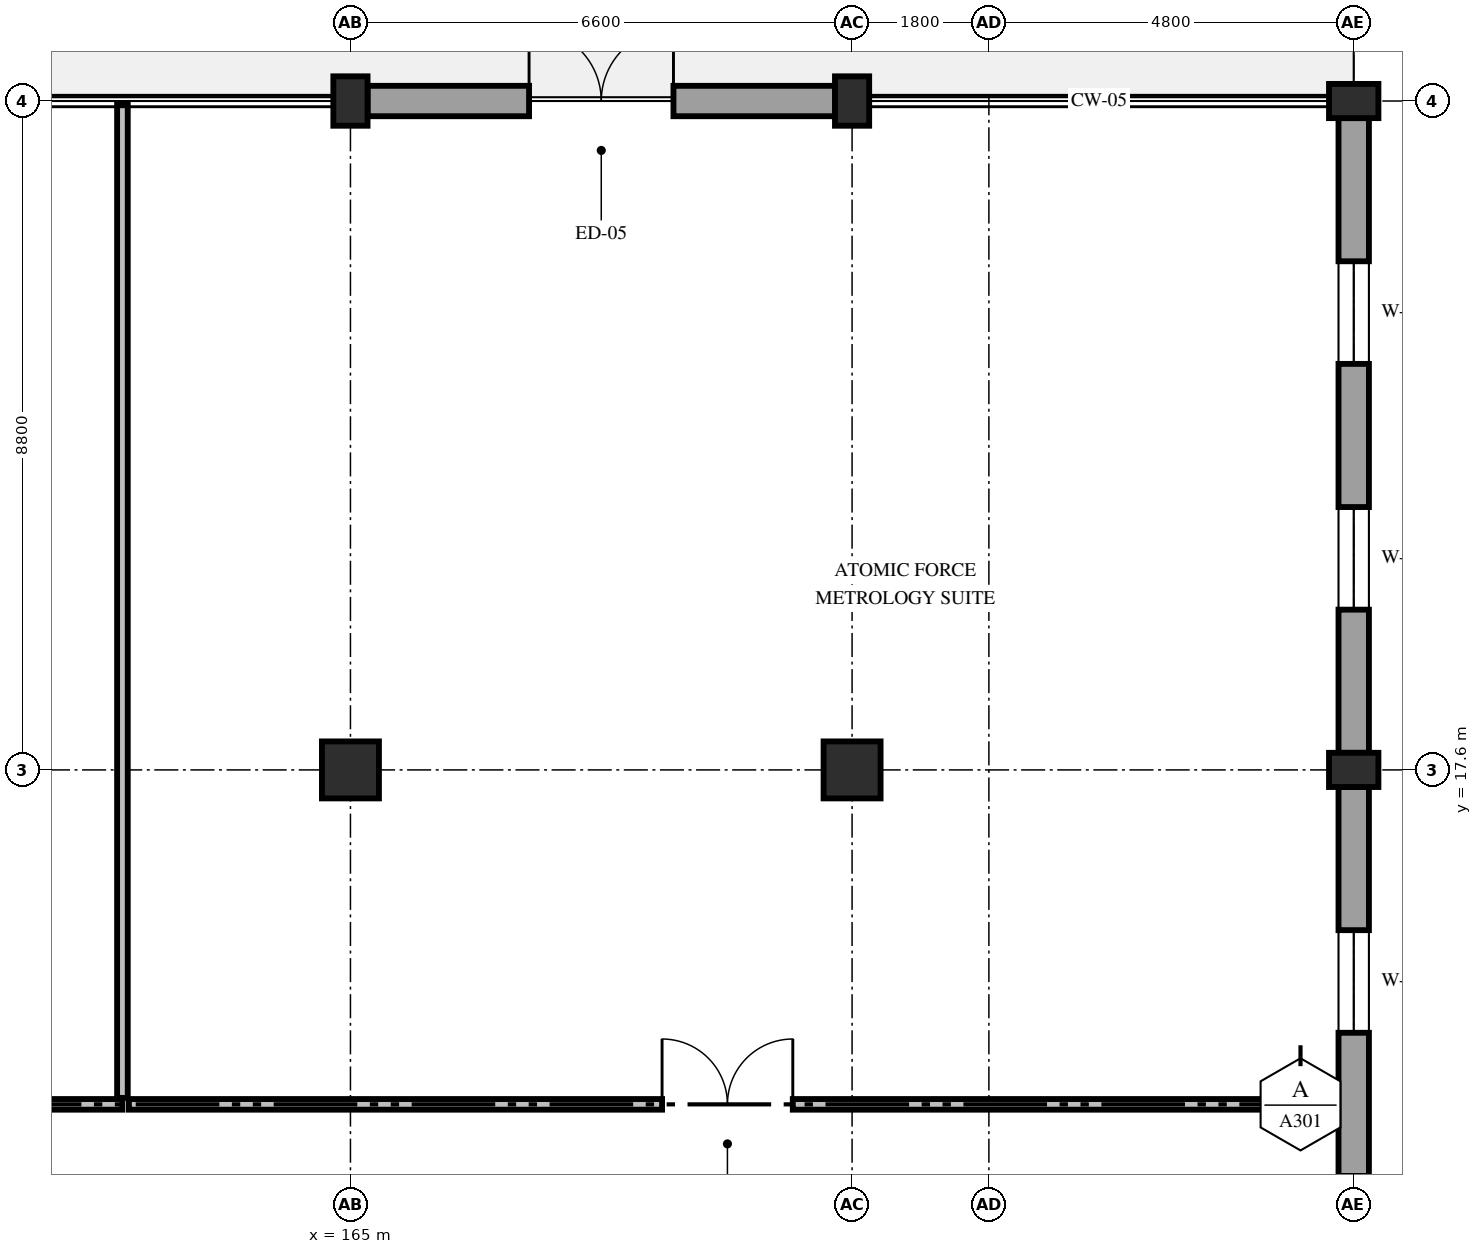
"""IFC4 building model, lengths in metres.
Left out: names, types, materials, properties, quantities, classifications, styles, units other than length and angle.
Written with IfcOpenShell. Run it as: python <this file> out.ifc"""

import sys

from ifc_helpers import new_model, si_unit, direction, frame, frame_2d, origin, origin_2d, place, context, subcontext, project, spatial, rectangle, extrude, element, fill, save


model = new_model("IFC4")
c1 = context("Model", 3, precision=1e-05, world=origin(), true_north=direction((0.0, 1.0)))
c2 = subcontext(c1, "Body", "Model", "MODEL_VIEW")
j1 = project(units=[si_unit("LENGTHUNIT", "METRE"), si_unit("PLANEANGLEUNIT", "RADIAN")], contexts=[c1])
p1 = place(None, origin())
s1 = spatial("IfcSite", under=j1, at=p1, CompositionType="ELEMENT")
p2 = place(p1, origin())
s2 = spatial("IfcBuilding", under=s1, at=p2, CompositionType="ELEMENT")
p3 = place(p2, origin())
s3 = spatial("IfcBuildingStorey", under=s2, at=p3, CompositionType="ELEMENT", Elevation=0.0)
p4 = place(p3, frame((165.0, 17.6, 0.0), z_axis=(0.0, 0.0, 1.0), x_axis=(1.0, 0.0, 0.0)))
e1 = element("IfcColumn", 1, at=p4, inside=s3, PredefinedType="COLUMN", context=c2, shape_type="SweptSolid", body=[
    extrude(rectangle(XDim=0.75, YDim=0.75, at=origin_2d()), origin(), (0.0, 0.0, 1.0), 5.4),
])
p5 = place(p3, frame((165.0, 26.4, 0.0), z_axis=(0.0, 0.0, 1.0), x_axis=(1.0, 0.0, 0.0)))
e2 = element("IfcColumn", 2, at=p5, inside=s3, PredefinedType="PILASTER", context=c2, shape_type="SweptSolid", body=[
    extrude(rectangle(XDim=0.45, YDim=0.65, at=origin_2d()), origin(), (0.0, 0.0, 1.0), 5.4),
])
p6 = place(p3, frame((171.6, 17.6, 0.0), z_axis=(0.0, 0.0, 1.0), x_axis=(1.0, 0.0, 0.0)))
e3 = element("IfcColumn", 3, at=p6, inside=s3, PredefinedType="COLUMN", context=c2, shape_type="SweptSolid", body=[
    extrude(rectangle(XDim=0.75, YDim=0.75, at=origin_2d()), origin(), (0.0, 0.0, 1.0), 5.4),
])
for number, where, z_axis, x_axis in (
    (4, (171.6, 26.4, 0.0), (0.0, 0.0, 1.0), (1.0, 0.0, 0.0)),
    (5, (178.2, 17.6, 0.0), (0.0, 0.0, 1.0), (0.0, 1.0, 0.0)),
    (6, (178.2, 26.4, 0.0), (0.0, 0.0, 1.0), (0.0, 1.0, 0.0)),
):
    element("IfcColumn", number, at=place(p3, frame(where, z_axis=z_axis, x_axis=x_axis)), inside=s3, PredefinedType="PILASTER", context=c2, shape_type="SweptSolid", body=[
        extrude(rectangle(XDim=0.45, YDim=0.65, at=origin_2d()), origin(), (0.0, 0.0, 1.0), 5.4),
    ])
p7 = place(p3, frame((165.225, 26.4, 0.0), z_axis=(0.0, 0.0, 1.0), x_axis=(1.0, 0.0, 0.0)))
e7 = element("IfcWall", 7, at=p7, inside=s3, PredefinedType="STANDARD", context=c2, shape_type="SweptSolid", body=[
    extrude(rectangle(XDim=6.15, YDim=0.4, at=frame_2d((3.075, 0.0))), origin(), (0.0, 0.0, 1.0), 4.58),
])
p8 = place(p7, frame((2.125, 0.0, 0.0)))
e8 = element("IfcOpeningElement", 8, at=p8, cuts=e7, PredefinedType="OPENING", context=c2, shape_type="SweptSolid", body=[
    extrude(rectangle(XDim=1.9, YDim=2.4, at=frame_2d((0.95, 1.2))), frame((0.0, 0.215, 0.0), z_axis=(0.0, -1.0, 0.0), x_axis=(1.0, 0.0, 0.0)), (0.0, 0.0, 1.0), 0.43),
])
p9 = place(p3, frame((178.2, 26.175, 0.0), z_axis=(0.0, 0.0, 1.0), x_axis=(0.0, -1.0, 0.0)))
e9 = element("IfcWall", 9, at=p9, inside=s3, PredefinedType="STANDARD", context=c2, shape_type="SweptSolid", body=[
    extrude(rectangle(XDim=8.35, YDim=0.4, at=frame_2d((4.175, 0.0))), origin(), (0.0, 0.0, 1.0), 4.58),
])
p10 = place(p9, frame((1.883, 0.0, 0.85)))
e10 = element("IfcOpeningElement", 10, at=p10, cuts=e9, PredefinedType="OPENING", context=c2, shape_type="SweptSolid", body=[
    extrude(rectangle(XDim=1.35, YDim=1.88, at=frame_2d((0.675, 0.94))), frame((0.0, 0.215, 0.0), z_axis=(0.0, -1.0, 0.0), x_axis=(1.0, 0.0, 0.0)), (0.0, 0.0, 1.0), 0.43),
])
p11 = place(p9, frame((5.117, 0.0, 0.85)))
e11 = element("IfcOpeningElement", 11, at=p11, cuts=e9, PredefinedType="OPENING", context=c2, shape_type="SweptSolid", body=[
    extrude(rectangle(XDim=1.35, YDim=1.88, at=frame_2d((0.675, 0.94))), frame((0.0, 0.215, 0.0), z_axis=(0.0, -1.0, 0.0), x_axis=(1.0, 0.0, 0.0)), (0.0, 0.0, 1.0), 0.43),
])
p12 = place(p3, frame((178.2, 17.375, 0.0), z_axis=(0.0, 0.0, 1.0), x_axis=(0.0, -1.0, 0.0)))
e12 = element("IfcWall", 12, at=p12, inside=s3, PredefinedType="STANDARD", context=c2, shape_type="SweptSolid", body=[
    extrude(rectangle(XDim=8.35, YDim=0.4, at=frame_2d((4.175, 0.0))), origin(), (0.0, 0.0, 1.0), 4.58),
])
p13 = place(p12, frame((1.883, 0.0, 0.85)))
e13 = element("IfcOpeningElement", 13, at=p13, cuts=e12, PredefinedType="OPENING", context=c2, shape_type="SweptSolid", body=[
    extrude(rectangle(XDim=1.35, YDim=1.88, at=frame_2d((0.675, 0.94))), frame((0.0, 0.215, 0.0), z_axis=(0.0, -1.0, 0.0), x_axis=(1.0, 0.0, 0.0)), (0.0, 0.0, 1.0), 0.43),
])
p14 = place(p12, frame((5.117, 0.0, 0.85)))
e14 = element("IfcOpeningElement", 14, at=p14, cuts=e12, PredefinedType="OPENING", context=c2, shape_type="SweptSolid", body=[
    extrude(rectangle(XDim=1.35, YDim=1.88, at=frame_2d((0.675, 0.94))), frame((0.0, 0.215, 0.0), z_axis=(0.0, -1.0, 0.0), x_axis=(1.0, 0.0, 0.0)), (0.0, 0.0, 1.0), 0.43),
])
p15 = place(p3, frame((145.285, 13.2, 0.0), z_axis=(0.0, 0.0, 1.0), x_axis=(1.0, 0.0, 0.0)))
e15 = element("IfcWall", 15, at=p15, inside=s3, PredefinedType="PARTITIONING", context=c2, shape_type="SweptSolid", body=[
    extrude(rectangle(XDim=16.715, YDim=0.14, at=frame_2d((8.357, 0.0))), origin(), (0.0, 0.0, 1.0), 4.665),
])
p16 = place(p15, frame((7.405, 0.0, 0.0)))
e16 = element("IfcOpeningElement", 16, at=p16, cuts=e15, PredefinedType="OPENING", context=c2, shape_type="SweptSolid", body=[
    extrude(rectangle(XDim=1.82, YDim=2.35, at=frame_2d((0.91, 1.175))), frame((0.0, 0.085, 0.0), z_axis=(0.0, -1.0, 0.0), x_axis=(1.0, 0.0, 0.0)), (0.0, 0.0, 1.0), 0.17),
])
p17 = place(p3, frame((162.0, 13.285, 0.0), z_axis=(0.0, 0.0, 1.0), x_axis=(0.0, 1.0, 0.0)))
e17 = element("IfcWall", 17, at=p17, inside=s3, PredefinedType="PARTITIONING", context=c2, shape_type="SweptSolid", body=[
    extrude(rectangle(XDim=13.075, YDim=0.14, at=frame_2d((6.538, 0.0))), origin(), (0.0, 0.0, 1.0), 4.58),
])
p18 = place(p3, frame((162.085, 13.2, 0.0), z_axis=(0.0, 0.0, 1.0), x_axis=(1.0, 0.0, 0.0)))
e18 = element("IfcWall", 18, at=p18, inside=s3, PredefinedType="PARTITIONING", context=c2, shape_type="SweptSolid", body=[
    extrude(rectangle(XDim=15.9, YDim=0.14, at=frame_2d((7.95, 0.0))), origin(), (0.0, 0.0, 1.0), 4.58),
])
p19 = place(p18, frame((7.015, 0.0, 0.0)))
e19 = element("IfcOpeningElement", 19, at=p19, cuts=e18, PredefinedType="OPENING", context=c2, shape_type="SweptSolid", body=[
    extrude(rectangle(XDim=1.72, YDim=2.35, at=frame_2d((0.86, 1.175))), frame((0.0, 0.085, 0.0), z_axis=(0.0, -1.0, 0.0), x_axis=(1.0, 0.0, 0.0)), (0.0, 0.0, 1.0), 0.17),
])
p20 = place(p8, origin())
e20 = element("IfcDoor", 20, at=p20, inside=s3, OperationType="DOUBLE_DOOR_SINGLE_SWING", PredefinedType="DOOR", context=c2, shape_type="SweptSolid", body=[
    extrude(rectangle(XDim=1.9, YDim=2.4, at=frame_2d((0.95, 1.2))), frame((0.0, 0.025, 0.0), z_axis=(0.0, -1.0, 0.0), x_axis=(1.0, 0.0, 0.0)), (0.0, 0.0, 1.0), 0.05),
])
fill(e8, e20)
p21 = place(p10, origin())
e21 = element("IfcWindow", 21, at=p21, inside=s3, PartitioningType="SINGLE_PANEL", PredefinedType="WINDOW", context=c2, shape_type="SweptSolid", body=[
    extrude(rectangle(XDim=1.35, YDim=1.88, at=frame_2d((0.675, 0.94))), frame((0.0, 0.03, 0.0), z_axis=(0.0, -1.0, 0.0), x_axis=(1.0, 0.0, 0.0)), (0.0, 0.0, 1.0), 0.06),
])
fill(e10, e21)
p22 = place(p11, origin())
e22 = element("IfcWindow", 22, at=p22, inside=s3, PartitioningType="SINGLE_PANEL", PredefinedType="WINDOW", context=c2, shape_type="SweptSolid", body=[
    extrude(rectangle(XDim=1.35, YDim=1.88, at=frame_2d((0.675, 0.94))), frame((0.0, 0.03, 0.0), z_axis=(0.0, -1.0, 0.0), x_axis=(1.0, 0.0, 0.0)), (0.0, 0.0, 1.0), 0.06),
])
fill(e11, e22)
p23 = place(p13, origin())
e23 = element("IfcWindow", 23, at=p23, inside=s3, PartitioningType="SINGLE_PANEL", PredefinedType="WINDOW", context=c2, shape_type="SweptSolid", body=[
    extrude(rectangle(XDim=1.35, YDim=1.88, at=frame_2d((0.675, 0.94))), frame((0.0, 0.03, 0.0), z_axis=(0.0, -1.0, 0.0), x_axis=(1.0, 0.0, 0.0)), (0.0, 0.0, 1.0), 0.06),
])
fill(e13, e23)
p24 = place(p19, origin())
e24 = element("IfcDoor", 24, at=p24, inside=s3, OperationType="DOUBLE_DOOR_SINGLE_SWING", PredefinedType="DOOR", context=c2, shape_type="SweptSolid", body=[
    extrude(rectangle(XDim=1.72, YDim=2.35, at=frame_2d((0.86, 1.175))), frame((0.0, 0.025, 0.0), z_axis=(0.0, -1.0, 0.0), x_axis=(1.0, 0.0, 0.0)), (0.0, 0.0, 1.0), 0.05),
])
fill(e19, e24)
save(model, sys.argv[1])
